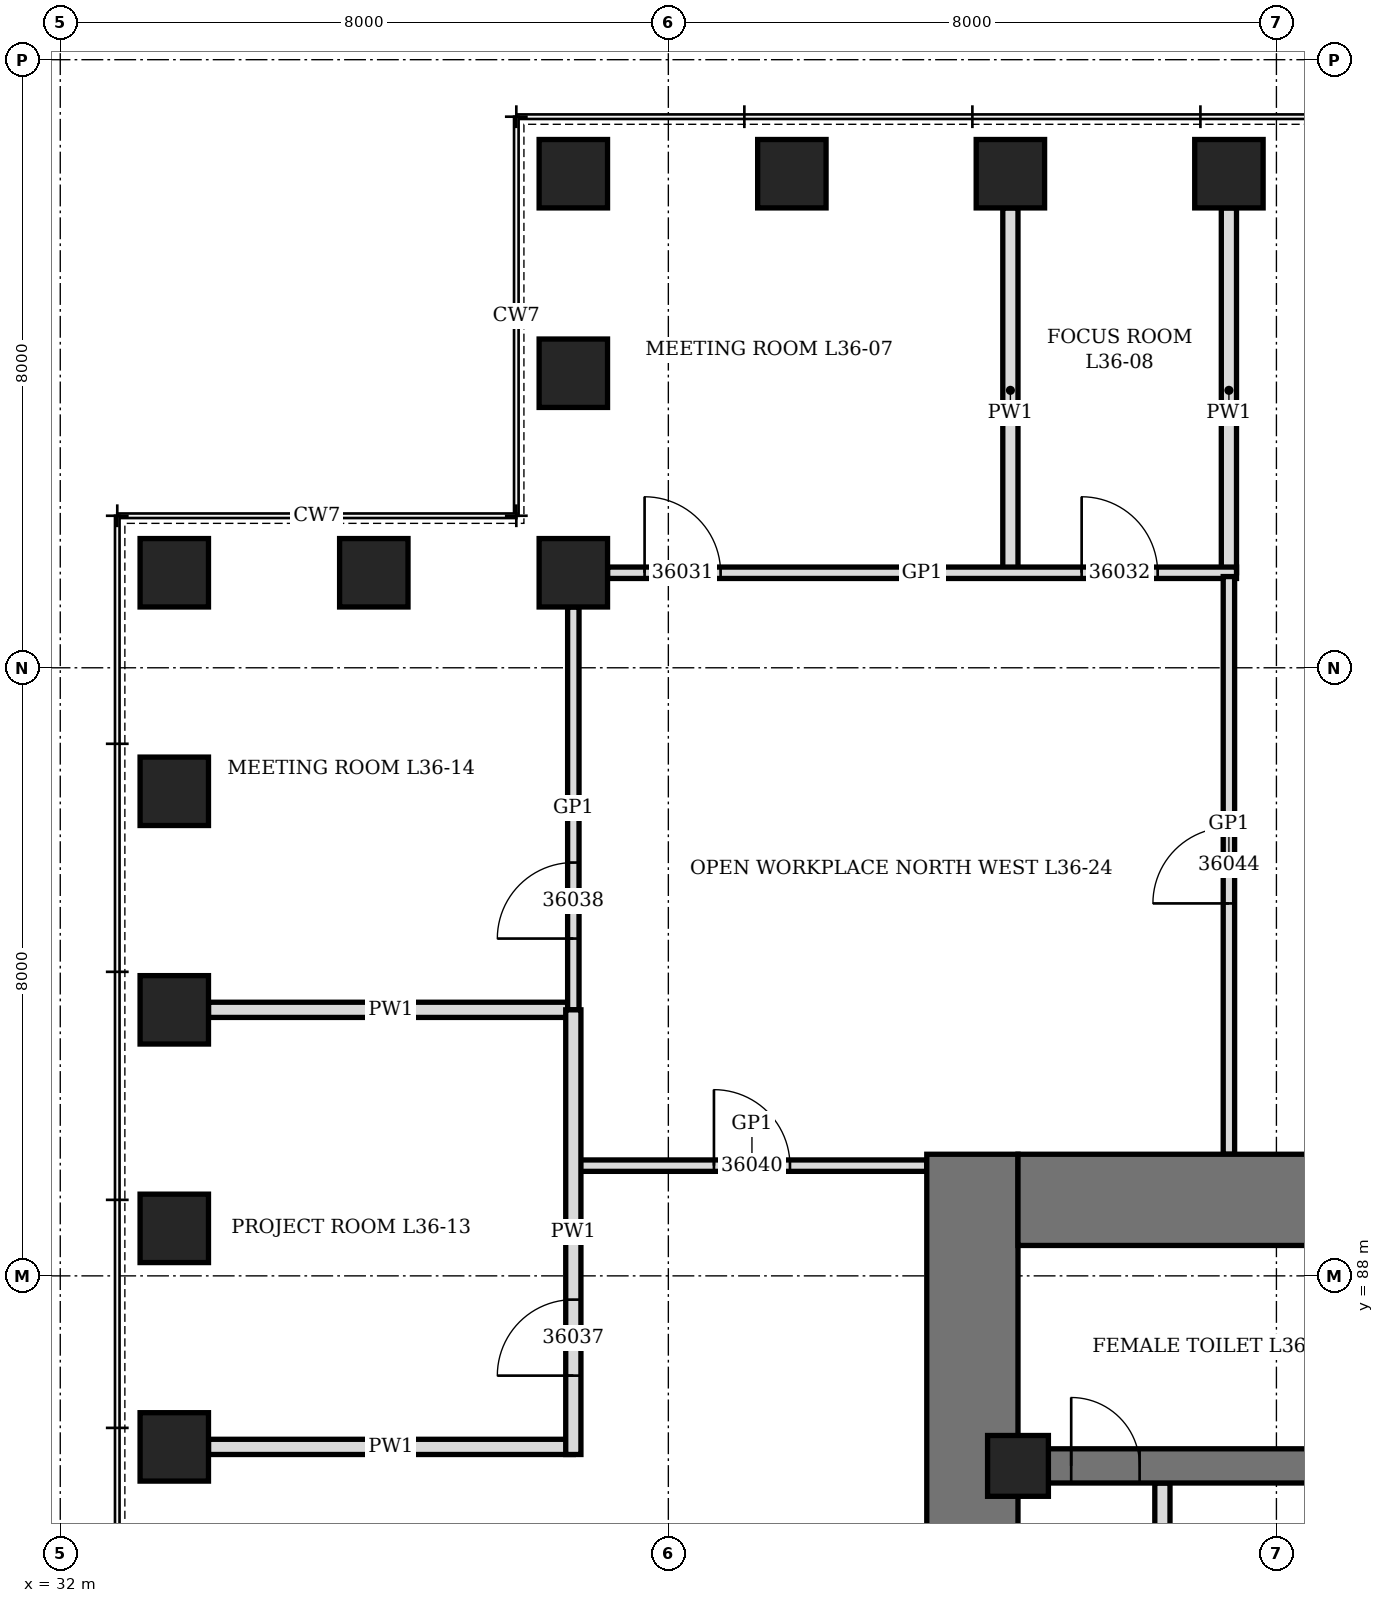
"""IFC4 building model, lengths in metres.
Left out: names, types, materials, properties, quantities, classifications, styles, units other than length and angle.
Written with IfcOpenShell. Run it as: python <this file> out.ifc"""

import sys

from ifc_helpers import new_model, si_unit, direction, frame, frame_2d, origin, origin_2d, place, context, subcontext, project, spatial, rectangle, hollow_rectangle, extrude, element, fill, save


model = new_model("IFC4")
c1 = context("Model", 3, precision=1e-05, world=origin(), true_north=direction((0.0, 1.0)))
c2 = subcontext(c1, "Body", "Model", "MODEL_VIEW")
j1 = project(units=[si_unit("LENGTHUNIT", "METRE"), si_unit("PLANEANGLEUNIT", "RADIAN")], contexts=[c1])
p1 = place(None, origin())
s1 = spatial("IfcSite", under=j1, at=p1, CompositionType="ELEMENT")
p2 = place(p1, origin())
s2 = spatial("IfcBuilding", under=s1, at=p2, CompositionType="ELEMENT")
p3 = place(p2, frame((0.0, 0.0, 162.7)))
s3 = spatial("IfcBuildingStorey", under=s2, at=p3, CompositionType="ELEMENT", Elevation=162.7)
for number, where, z_axis, x_axis in (
    (1, (47.375, 102.5, 0.0), (0.0, 0.0, 1.0), (1.0, 0.0, 0.0)),
    (2, (44.5, 102.5, 0.0), (0.0, 0.0, 1.0), (1.0, 0.0, 0.0)),
    (3, (41.625, 102.5, 0.0), (0.0, 0.0, 1.0), (1.0, 0.0, 0.0)),
    (4, (38.75, 102.5, 0.0), (0.0, 0.0, 1.0), (0.0, 1.0, 0.0)),
    (5, (38.75, 99.875, 0.0), (0.0, 0.0, 1.0), (0.0, 1.0, 0.0)),
    (6, (38.75, 97.25, 0.0), (0.0, 0.0, 1.0), (1.0, 0.0, 0.0)),
    (7, (36.125, 97.25, 0.0), (0.0, 0.0, 1.0), (1.0, 0.0, 0.0)),
    (8, (33.5, 97.25, 0.0), (0.0, 0.0, 1.0), (0.0, 1.0, 0.0)),
    (9, (33.5, 94.375, 0.0), (0.0, 0.0, 1.0), (0.0, 1.0, 0.0)),
    (10, (33.5, 91.5, 0.0), (0.0, 0.0, 1.0), (0.0, 1.0, 0.0)),
    (11, (33.5, 88.625, 0.0), (0.0, 0.0, 1.0), (0.0, 1.0, 0.0)),
    (12, (33.5, 85.75, 0.0), (0.0, 0.0, 1.0), (0.0, 1.0, 0.0)),
):
    element("IfcColumn", number, at=place(p3, frame(where, z_axis=z_axis, x_axis=x_axis)), inside=s3, PredefinedType="COLUMN", context=c2, shape_type="SweptSolid", body=[
        extrude(hollow_rectangle(XDim=0.9, YDim=0.9, WallThickness=0.12, at=origin_2d()), origin(), (0.0, 0.0, 1.0), 4.2),
    ])
p4 = place(p3, frame((44.0, 70.4, 0.0), z_axis=(0.0, 0.0, 1.0), x_axis=(0.0, 1.0, 0.0)))
e13 = element("IfcWall", 13, at=p4, inside=s3, PredefinedType="SHEAR", context=c2, shape_type="SweptSolid", body=[
    extrude(rectangle(XDim=19.2, YDim=1.2, at=frame_2d((9.6, 0.0))), origin(), (0.0, 0.0, 1.0), 4.2),
])
p5 = place(p4, frame((8.6, 0.0, 0.0)))
e14 = element("IfcOpeningElement", 14, at=p5, cuts=e13, PredefinedType="OPENING", context=c2, shape_type="SweptSolid", body=[
    extrude(rectangle(XDim=2.0, YDim=2.4, at=frame_2d((1.0, 1.2))), frame((0.0, 0.61, 0.0), z_axis=(0.0, -1.0, 0.0), x_axis=(1.0, 0.0, 0.0)), (0.0, 0.0, 1.0), 1.22),
])
p6 = place(p3, frame((44.6, 89.0, 0.0), z_axis=(0.0, 0.0, 1.0), x_axis=(1.0, 0.0, 0.0)))
e15 = element("IfcWall", 15, at=p6, inside=s3, PredefinedType="SHEAR", context=c2, shape_type="SweptSolid", body=[
    extrude(rectangle(XDim=22.8, YDim=1.2, at=frame_2d((11.4, 0.0))), origin(), (0.0, 0.0, 1.0), 4.2),
])
p7 = place(p6, frame((9.475, 0.0, 0.0)))
e16 = element("IfcOpeningElement", 16, at=p7, cuts=e15, PredefinedType="OPENING", context=c2, shape_type="SweptSolid", body=[
    extrude(rectangle(XDim=1.0, YDim=2.1, at=frame_2d((0.5, 1.05))), frame((0.0, 0.61, 0.0), z_axis=(0.0, -1.0, 0.0), x_axis=(1.0, 0.0, 0.0)), (0.0, 0.0, 1.0), 1.22),
])
p8 = place(p6, frame((6.65, 0.0, 0.0)))
e17 = element("IfcOpeningElement", 17, at=p8, cuts=e15, PredefinedType="OPENING", context=c2, shape_type="SweptSolid", body=[
    extrude(rectangle(XDim=0.9, YDim=2.1, at=frame_2d((0.45, 1.05))), frame((0.0, 0.61, 0.0), z_axis=(0.0, -1.0, 0.0), x_axis=(1.0, 0.0, 0.0)), (0.0, 0.0, 1.0), 1.22),
])
p9 = place(p6, frame((13.012, 0.0, 0.0)))
e18 = element("IfcOpeningElement", 18, at=p9, cuts=e15, PredefinedType="OPENING", context=c2, shape_type="SweptSolid", body=[
    extrude(rectangle(XDim=0.9, YDim=2.1, at=frame_2d((0.45, 1.05))), frame((0.0, 0.61, 0.0), z_axis=(0.0, -1.0, 0.0), x_axis=(1.0, 0.0, 0.0)), (0.0, 0.0, 1.0), 1.22),
])
p10 = place(p3, frame((44.6, 85.5, 0.0), z_axis=(0.0, 0.0, 1.0), x_axis=(1.0, 0.0, 0.0)))
e19 = element("IfcWall", 19, at=p10, inside=s3, PredefinedType="SHEAR", context=c2, shape_type="SweptSolid", body=[
    extrude(rectangle(XDim=5.175, YDim=0.45, at=frame_2d((2.587, 0.0))), origin(), (0.0, 0.0, 1.0), 4.2),
])
p11 = place(p10, frame((0.7, 0.0, 0.0)))
e20 = element("IfcOpeningElement", 20, at=p11, cuts=e19, PredefinedType="OPENING", context=c2, shape_type="SweptSolid", body=[
    extrude(rectangle(XDim=0.9, YDim=2.1, at=frame_2d((0.45, 1.05))), frame((0.0, 0.235, 0.0), z_axis=(0.0, -1.0, 0.0), x_axis=(1.0, 0.0, 0.0)), (0.0, 0.0, 1.0), 0.47),
])
p12 = place(p3, frame((44.6, 85.5, 0.0), z_axis=(0.0, 0.0, 1.0), x_axis=(1.0, 0.0, 0.0)))
e21 = element("IfcColumn", 21, at=p12, inside=s3, PredefinedType="COLUMN", context=c2, shape_type="SweptSolid", body=[
    extrude(hollow_rectangle(XDim=0.8, YDim=0.8, WallThickness=0.1, at=origin_2d()), origin(), (0.0, 0.0, 1.0), 4.2),
])
p13 = place(p3, frame((46.5, 82.225, 0.0), z_axis=(0.0, 0.0, 1.0), x_axis=(0.0, 1.0, 0.0)))
e22 = element("IfcWall", 22, at=p13, inside=s3, PredefinedType="PARTITIONING", context=c2, shape_type="SweptSolid", body=[
    extrude(rectangle(XDim=3.05, YDim=0.2, at=frame_2d((1.525, 0.0))), origin(), (0.0, 0.0, 1.0), 4.04),
])
p14 = place(p13, frame((1.075, 0.0, 0.0)))
e23 = element("IfcOpeningElement", 23, at=p14, cuts=e22, PredefinedType="OPENING", context=c2, shape_type="SweptSolid", body=[
    extrude(rectangle(XDim=0.9, YDim=2.1, at=frame_2d((0.45, 1.05))), frame((0.0, 0.11, 0.0), z_axis=(0.0, -1.0, 0.0), x_axis=(1.0, 0.0, 0.0)), (0.0, 0.0, 1.0), 0.22),
])
p15 = place(p3, frame((44.5, 97.25, 0.0), z_axis=(0.0, 0.0, 1.0), x_axis=(0.0, 1.0, 0.0)))
e24 = element("IfcWall", 24, at=p15, inside=s3, PredefinedType="PARTITIONING", context=c2, shape_type="SweptSolid", body=[
    extrude(rectangle(XDim=4.8, YDim=0.2, at=frame_2d((2.4, 0.0))), origin(), (0.0, 0.0, 1.0), 2.74),
])
p16 = place(p3, frame((47.375, 97.25, 0.0), z_axis=(0.0, 0.0, 1.0), x_axis=(0.0, 1.0, 0.0)))
e25 = element("IfcWall", 25, at=p16, inside=s3, PredefinedType="PARTITIONING", context=c2, shape_type="SweptSolid", body=[
    extrude(rectangle(XDim=4.8, YDim=0.2, at=frame_2d((2.4, 0.0))), origin(), (0.0, 0.0, 1.0), 3.278),
])
for number, where, z_axis, x_axis in (
    (26, (33.95, 85.75, 0.0), (0.0, 0.0, 1.0), (1.0, 0.0, 0.0)),
    (27, (33.95, 91.5, 0.0), (0.0, 0.0, 1.0), (1.0, 0.0, 0.0)),
):
    element("IfcWall", number, at=place(p3, frame(where, z_axis=z_axis, x_axis=x_axis)), inside=s3, PredefinedType="PARTITIONING", context=c2, shape_type="SweptSolid", body=[
        extrude(rectangle(XDim=4.8, YDim=0.2, at=frame_2d((2.4, 0.0))), origin(), (0.0, 0.0, 1.0), 3.428),
    ])
p17 = place(p3, frame((38.8, 89.45, 0.0), z_axis=(0.0, 0.0, 1.0), x_axis=(1.0, 0.0, 0.0)))
e28 = element("IfcWall", 28, at=p17, inside=s3, PredefinedType="PARTITIONING", context=c2, shape_type="SweptSolid", body=[
    extrude(rectangle(XDim=4.6, YDim=0.15, at=frame_2d((2.3, 0.0))), origin(), (0.0, 0.0, 1.0), 4.04),
])
p18 = place(p17, frame((1.8, 0.0, 0.0)))
e29 = element("IfcOpeningElement", 29, at=p18, cuts=e28, PredefinedType="OPENING", context=c2, shape_type="SweptSolid", body=[
    extrude(rectangle(XDim=1.0, YDim=2.4, at=frame_2d((0.5, 1.2))), frame((0.0, 0.085, 0.0), z_axis=(0.0, -1.0, 0.0), x_axis=(1.0, 0.0, 0.0)), (0.0, 0.0, 1.0), 0.17),
])
p19 = place(p3, frame((39.2, 97.25, 0.0), z_axis=(0.0, 0.0, 1.0), x_axis=(1.0, 0.0, 0.0)))
e30 = element("IfcWall", 30, at=p19, inside=s3, PredefinedType="PARTITIONING", context=c2, shape_type="SweptSolid", body=[
    extrude(rectangle(XDim=8.275, YDim=0.15, at=frame_2d((4.138, 0.0))), origin(), (0.0, 0.0, 1.0), 4.04),
])
p20 = place(p19, frame((0.488, 0.0, 0.0)))
e31 = element("IfcOpeningElement", 31, at=p20, cuts=e30, PredefinedType="OPENING", context=c2, shape_type="SweptSolid", body=[
    extrude(rectangle(XDim=1.0, YDim=2.4, at=frame_2d((0.5, 1.2))), frame((0.0, 0.085, 0.0), z_axis=(0.0, -1.0, 0.0), x_axis=(1.0, 0.0, 0.0)), (0.0, 0.0, 1.0), 0.17),
])
p21 = place(p19, frame((6.238, 0.0, 0.0)))
e32 = element("IfcOpeningElement", 32, at=p21, cuts=e30, PredefinedType="OPENING", context=c2, shape_type="SweptSolid", body=[
    extrude(rectangle(XDim=1.0, YDim=2.4, at=frame_2d((0.5, 1.2))), frame((0.0, 0.085, 0.0), z_axis=(0.0, -1.0, 0.0), x_axis=(1.0, 0.0, 0.0)), (0.0, 0.0, 1.0), 0.17),
])
p22 = place(p3, frame((38.75, 91.5, 0.0), z_axis=(0.0, 0.0, 1.0), x_axis=(0.0, 1.0, 0.0)))
e33 = element("IfcWall", 33, at=p22, inside=s3, PredefinedType="PARTITIONING", context=c2, shape_type="SweptSolid", body=[
    extrude(rectangle(XDim=5.3, YDim=0.15, at=frame_2d((2.65, 0.0))), origin(), (0.0, 0.0, 1.0), 4.04),
])
p23 = place(p22, frame((0.938, 0.0, 0.0)))
e34 = element("IfcOpeningElement", 34, at=p23, cuts=e33, PredefinedType="OPENING", context=c2, shape_type="SweptSolid", body=[
    extrude(rectangle(XDim=1.0, YDim=2.4, at=frame_2d((0.5, 1.2))), frame((0.0, 0.085, 0.0), z_axis=(0.0, -1.0, 0.0), x_axis=(1.0, 0.0, 0.0)), (0.0, 0.0, 1.0), 0.17),
])
p24 = place(p3, frame((38.75, 85.65, 0.0), z_axis=(0.0, 0.0, 1.0), x_axis=(0.0, 1.0, 0.0)))
e35 = element("IfcWall", 35, at=p24, inside=s3, PredefinedType="PARTITIONING", context=c2, shape_type="SweptSolid", body=[
    extrude(rectangle(XDim=5.85, YDim=0.2, at=frame_2d((2.925, 0.0))), origin(), (0.0, 0.0, 1.0), 4.04),
])
p25 = place(p24, frame((1.038, 0.0, 0.0)))
e36 = element("IfcOpeningElement", 36, at=p25, cuts=e35, PredefinedType="OPENING", context=c2, shape_type="SweptSolid", body=[
    extrude(rectangle(XDim=1.0, YDim=2.1, at=frame_2d((0.5, 1.05))), frame((0.0, 0.11, 0.0), z_axis=(0.0, -1.0, 0.0), x_axis=(1.0, 0.0, 0.0)), (0.0, 0.0, 1.0), 0.22),
])
p26 = place(p3, frame((47.375, 89.6, 0.0), z_axis=(0.0, 0.0, 1.0), x_axis=(0.0, 1.0, 0.0)))
e37 = element("IfcWall", 37, at=p26, inside=s3, PredefinedType="PARTITIONING", context=c2, shape_type="SweptSolid", body=[
    extrude(rectangle(XDim=7.6, YDim=0.15, at=frame_2d((3.8, 0.0))), origin(), (0.0, 0.0, 1.0), 3.278),
])
p27 = place(p26, frame((3.3, 0.0, 0.0)))
e38 = element("IfcOpeningElement", 38, at=p27, cuts=e37, PredefinedType="OPENING", context=c2, shape_type="SweptSolid", body=[
    extrude(rectangle(XDim=1.0, YDim=2.4, at=frame_2d((0.5, 1.2))), frame((0.0, 0.085, 0.0), z_axis=(0.0, -1.0, 0.0), x_axis=(1.0, 0.0, 0.0)), (0.0, 0.0, 1.0), 0.17),
])
p28 = place(p11, origin())
e39 = element("IfcDoor", 39, at=p28, inside=s3, OperationType="SINGLE_SWING_RIGHT", PredefinedType="DOOR", context=c2, shape_type="SweptSolid", body=[
    extrude(rectangle(XDim=0.9, YDim=2.1, at=frame_2d((0.45, 1.05))), frame((0.0, 0.225, 0.0), z_axis=(0.0, -1.0, 0.0), x_axis=(1.0, 0.0, 0.0)), (0.0, 0.0, 1.0), 0.449),
])
fill(e20, e39)
p29 = place(p20, origin())
e40 = element("IfcDoor", 40, at=p29, inside=s3, OperationType="SINGLE_SWING_RIGHT", PredefinedType="DOOR", context=c2, shape_type="SweptSolid", body=[
    extrude(rectangle(XDim=1.0, YDim=2.4, at=frame_2d((0.5, 1.2))), frame((0.0, 0.075, 0.0), z_axis=(0.0, -1.0, 0.0), x_axis=(1.0, 0.0, 0.0)), (0.0, 0.0, 1.0), 0.149),
])
fill(e31, e40)
p30 = place(p21, origin())
e41 = element("IfcDoor", 41, at=p30, inside=s3, OperationType="SINGLE_SWING_RIGHT", PredefinedType="DOOR", context=c2, shape_type="SweptSolid", body=[
    extrude(rectangle(XDim=1.0, YDim=2.4, at=frame_2d((0.5, 1.2))), frame((0.0, 0.075, 0.0), z_axis=(0.0, -1.0, 0.0), x_axis=(1.0, 0.0, 0.0)), (0.0, 0.0, 1.0), 0.149),
])
fill(e32, e41)
p31 = place(p25, origin())
e42 = element("IfcDoor", 42, at=p31, inside=s3, OperationType="SINGLE_SWING_LEFT", PredefinedType="DOOR", context=c2, shape_type="SweptSolid", body=[
    extrude(rectangle(XDim=1.0, YDim=2.1, at=frame_2d((0.5, 1.05))), frame((0.0, 0.1, 0.0), z_axis=(0.0, -1.0, 0.0), x_axis=(1.0, 0.0, 0.0)), (0.0, 0.0, 1.0), 0.199),
])
fill(e36, e42)
p32 = place(p23, origin())
e43 = element("IfcDoor", 43, at=p32, inside=s3, OperationType="SINGLE_SWING_RIGHT", PredefinedType="DOOR", context=c2, shape_type="SweptSolid", body=[
    extrude(rectangle(XDim=1.0, YDim=2.4, at=frame_2d((0.5, 1.2))), frame((0.0, 0.075, 0.0), z_axis=(0.0, -1.0, 0.0), x_axis=(1.0, 0.0, 0.0)), (0.0, 0.0, 1.0), 0.149),
])
fill(e34, e43)
p33 = place(p18, origin())
e44 = element("IfcDoor", 44, at=p33, inside=s3, OperationType="SINGLE_SWING_RIGHT", PredefinedType="DOOR", context=c2, shape_type="SweptSolid", body=[
    extrude(rectangle(XDim=1.0, YDim=2.4, at=frame_2d((0.5, 1.2))), frame((0.0, 0.075, 0.0), z_axis=(0.0, -1.0, 0.0), x_axis=(1.0, 0.0, 0.0)), (0.0, 0.0, 1.0), 0.149),
])
fill(e29, e44)
p34 = place(p27, origin())
e45 = element("IfcDoor", 45, at=p34, inside=s3, OperationType="SINGLE_SWING_RIGHT", PredefinedType="DOOR", context=c2, shape_type="SweptSolid", body=[
    extrude(rectangle(XDim=1.0, YDim=2.4, at=frame_2d((0.5, 1.2))), frame((0.0, 0.075, 0.0), z_axis=(0.0, -1.0, 0.0), x_axis=(1.0, 0.0, 0.0)), (0.0, 0.0, 1.0), 0.149),
])
fill(e38, e45)
save(model, sys.argv[1])
